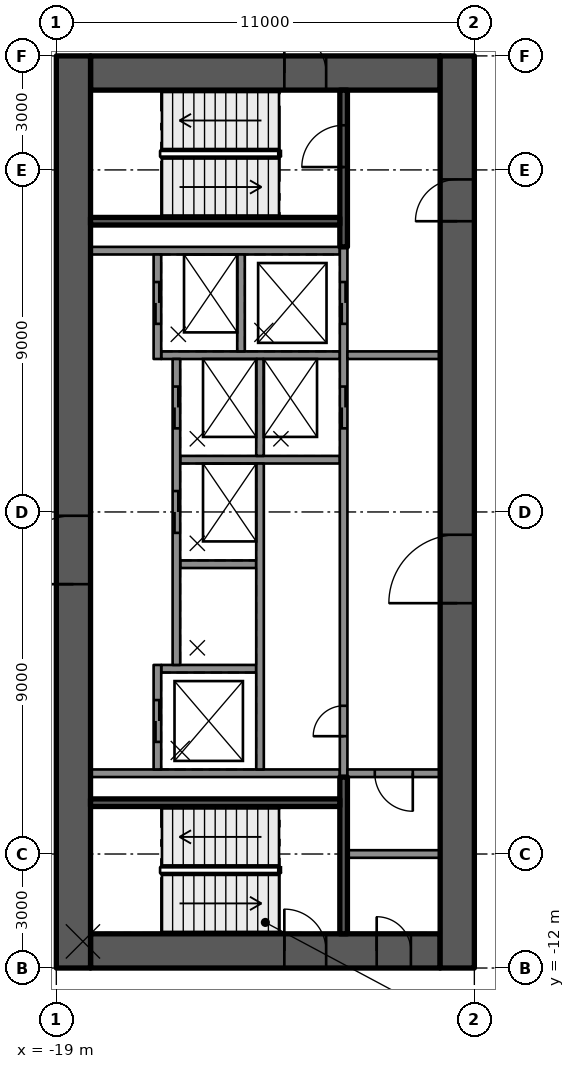
"""IFC4 building model, lengths in metres.
Left out: names, types, materials, properties, quantities, classifications, styles, units other than length and angle.
Written with IfcOpenShell. Run it as: python <this file> out.ifc"""

import sys

from ifc_helpers import new_model, si_unit, direction, frame, frame_2d, origin, place, context, subcontext, project, spatial, rectangle, extrude, element, fill, save


model = new_model("IFC4")
c1 = context("Model", 3, precision=1e-05, world=origin(), true_north=direction((0.0, 1.0)))
c2 = subcontext(c1, "Body", "Model", "MODEL_VIEW")
j1 = project(units=[si_unit("LENGTHUNIT", "METRE"), si_unit("PLANEANGLEUNIT", "RADIAN")], contexts=[c1])
p1 = place(None, origin())
s1 = spatial("IfcSite", under=j1, at=p1, CompositionType="ELEMENT")
p2 = place(p1, origin())
s2 = spatial("IfcBuilding", under=s1, at=p2, CompositionType="ELEMENT")
p3 = place(p2, frame((0.0, 0.0, 163.1)))
s3 = spatial("IfcBuildingStorey", under=s2, at=p3, CompositionType="ELEMENT", Elevation=163.1)
p4 = place(p3, frame((-18.1, 11.55, 0.0), z_axis=(0.0, 0.0, 1.0), x_axis=(1.0, 0.0, 0.0)))
e1 = element("IfcWall", 1, at=p4, inside=s3, PredefinedType="SHEAR", context=c2, shape_type="SweptSolid", body=[
    extrude(rectangle(XDim=9.2, YDim=0.9, at=frame_2d((4.6, 0.0))), origin(), (0.0, 0.0, 1.0), 4.0),
])
p5 = place(p4, frame((5.1, 0.0, 0.0)))
e2 = element("IfcOpeningElement", 2, at=p5, cuts=e1, PredefinedType="OPENING", context=c2, shape_type="SweptSolid", body=[
    extrude(rectangle(XDim=1.1, YDim=2.1, at=frame_2d((0.55, 1.05))), frame((0.0, 0.46, 0.0), z_axis=(0.0, -1.0, 0.0), x_axis=(1.0, 0.0, 0.0)), (0.0, 0.0, 1.0), 0.92),
])
p6 = place(p3, frame((-18.1, -11.55, 0.0), z_axis=(0.0, 0.0, 1.0), x_axis=(1.0, 0.0, 0.0)))
e3 = element("IfcWall", 3, at=p6, inside=s3, PredefinedType="SHEAR", context=c2, shape_type="SweptSolid", body=[
    extrude(rectangle(XDim=9.2, YDim=0.9, at=frame_2d((4.6, 0.0))), origin(), (0.0, 0.0, 1.0), 4.0),
])
p7 = place(p6, frame((5.1, 0.0, 0.0)))
e4 = element("IfcOpeningElement", 4, at=p7, cuts=e3, PredefinedType="OPENING", context=c2, shape_type="SweptSolid", body=[
    extrude(rectangle(XDim=1.1, YDim=2.1, at=frame_2d((0.55, 1.05))), frame((0.0, 0.46, 0.0), z_axis=(0.0, -1.0, 0.0), x_axis=(1.0, 0.0, 0.0)), (0.0, 0.0, 1.0), 0.92),
])
p8 = place(p6, frame((7.53, 0.0, 0.0)))
e5 = element("IfcOpeningElement", 5, at=p8, cuts=e3, PredefinedType="OPENING", context=c2, shape_type="SweptSolid", body=[
    extrude(rectangle(XDim=0.9, YDim=2.1, at=frame_2d((0.45, 1.05))), frame((0.0, 0.46, 0.0), z_axis=(0.0, -1.0, 0.0), x_axis=(1.0, 0.0, 0.0)), (0.0, 0.0, 1.0), 0.92),
])
p9 = place(p3, frame((-18.55, -12.0, 0.0), z_axis=(0.0, 0.0, 1.0), x_axis=(0.0, 1.0, 0.0)))
e6 = element("IfcWall", 6, at=p9, inside=s3, PredefinedType="SHEAR", context=c2, shape_type="SweptSolid", body=[
    extrude(rectangle(XDim=24.0, YDim=0.9, at=frame_2d((12.0, 0.0))), origin(), (0.0, 0.0, 1.0), 4.0),
])
p10 = place(p9, frame((10.1, 0.0, 0.0)))
e7 = element("IfcOpeningElement", 7, at=p10, cuts=e6, PredefinedType="OPENING", context=c2, shape_type="SweptSolid", body=[
    extrude(rectangle(XDim=1.8, YDim=2.1, at=frame_2d((0.9, 1.05))), frame((0.0, 0.46, 0.0), z_axis=(0.0, -1.0, 0.0), x_axis=(1.0, 0.0, 0.0)), (0.0, 0.0, 1.0), 0.92),
])
p11 = place(p3, frame((-8.45, -12.0, 0.0), z_axis=(0.0, 0.0, 1.0), x_axis=(0.0, 1.0, 0.0)))
e8 = element("IfcWall", 8, at=p11, inside=s3, PredefinedType="SHEAR", context=c2, shape_type="SweptSolid", body=[
    extrude(rectangle(XDim=24.0, YDim=0.9, at=frame_2d((12.0, 0.0))), origin(), (0.0, 0.0, 1.0), 4.0),
])
p12 = place(p11, frame((9.6, 0.0, 0.0)))
e9 = element("IfcOpeningElement", 9, at=p12, cuts=e8, PredefinedType="OPENING", context=c2, shape_type="SweptSolid", body=[
    extrude(rectangle(XDim=1.8, YDim=2.1, at=frame_2d((0.9, 1.05))), frame((0.0, 0.46, 0.0), z_axis=(0.0, -1.0, 0.0), x_axis=(1.0, 0.0, 0.0)), (0.0, 0.0, 1.0), 0.92),
])
p13 = place(p11, frame((19.65, 0.0, 0.0)))
e10 = element("IfcOpeningElement", 10, at=p13, cuts=e8, PredefinedType="OPENING", context=c2, shape_type="SweptSolid", body=[
    extrude(rectangle(XDim=1.1, YDim=2.1, at=frame_2d((0.55, 1.05))), frame((0.0, 0.46, 0.0), z_axis=(0.0, -1.0, 0.0), x_axis=(1.0, 0.0, 0.0)), (0.0, 0.0, 1.0), 0.92),
])
for number, where, z_axis, x_axis in (
    (11, (-11.54, 6.875, 0.0), (0.0, 0.0, 1.0), (-1.0, 0.0, 0.0)),
    (12, (-11.54, -6.875, 0.0), (0.0, 0.0, 1.0), (-1.0, 0.0, 0.0)),
):
    element("IfcWall", number, at=place(p3, frame(where, z_axis=z_axis, x_axis=x_axis)), inside=s3, PredefinedType="SOLIDWALL", context=c2, shape_type="SweptSolid", body=[
        extrude(rectangle(XDim=6.56, YDim=0.2, at=frame_2d((3.28, 0.0))), origin(), (0.0, 0.0, 1.0), 3.58),
    ])
p14 = place(p3, frame((-13.74, -4.125, 0.0), z_axis=(0.0, 0.0, 1.0), x_axis=(-1.0, 0.0, 0.0)))
e13 = element("IfcWall", 13, at=p14, inside=s3, PredefinedType="SOLIDWALL", context=c2, shape_type="SweptSolid", body=[
    extrude(rectangle(XDim=2.5, YDim=0.2, at=frame_2d((1.25, 0.0))), origin(), (0.0, 0.0, 1.0), 3.58),
])
p15 = place(p3, frame((-13.74, -1.375, 0.0), z_axis=(0.0, 0.0, 1.0), x_axis=(-1.0, 0.0, 0.0)))
e14 = element("IfcWall", 14, at=p15, inside=s3, PredefinedType="SOLIDWALL", context=c2, shape_type="SweptSolid", body=[
    extrude(rectangle(XDim=2.0, YDim=0.2, at=frame_2d((1.0, 0.0))), origin(), (0.0, 0.0, 1.0), 3.58),
])
p16 = place(p3, frame((-11.54, 1.375, 0.0), z_axis=(0.0, 0.0, 1.0), x_axis=(-1.0, 0.0, 0.0)))
e15 = element("IfcWall", 15, at=p16, inside=s3, PredefinedType="SOLIDWALL", context=c2, shape_type="SweptSolid", body=[
    extrude(rectangle(XDim=4.2, YDim=0.2, at=frame_2d((2.1, 0.0))), origin(), (0.0, 0.0, 1.0), 3.58),
])
p17 = place(p3, frame((-11.54, 4.125, 0.0), z_axis=(0.0, 0.0, 1.0), x_axis=(-1.0, 0.0, 0.0)))
e16 = element("IfcWall", 16, at=p17, inside=s3, PredefinedType="SOLIDWALL", context=c2, shape_type="SweptSolid", body=[
    extrude(rectangle(XDim=4.7, YDim=0.2, at=frame_2d((2.35, 0.0))), origin(), (0.0, 0.0, 1.0), 3.58),
])
p18 = place(p3, frame((-11.44, -6.975, 0.0), z_axis=(0.0, 0.0, 1.0), x_axis=(0.0, 1.0, 0.0)))
e17 = element("IfcWall", 17, at=p18, inside=s3, PredefinedType="SOLIDWALL", context=c2, shape_type="SweptSolid", body=[
    extrude(rectangle(XDim=13.95, YDim=0.2, at=frame_2d((6.975, 0.0))), origin(), (0.0, 0.0, 1.0), 3.58),
])
p19 = place(p18, frame((9.175, 0.0, 0.0)))
e18 = element("IfcOpeningElement", 18, at=p19, cuts=e17, PredefinedType="OPENING", context=c2, shape_type="SweptSolid", body=[
    extrude(rectangle(XDim=1.1, YDim=2.1, at=frame_2d((0.55, 1.05))), frame((0.0, 0.11, 0.0), z_axis=(0.0, -1.0, 0.0), x_axis=(1.0, 0.0, 0.0)), (0.0, 0.0, 1.0), 0.22),
])
p20 = place(p18, frame((11.925, 0.0, 0.0)))
e19 = element("IfcOpeningElement", 19, at=p20, cuts=e17, PredefinedType="OPENING", context=c2, shape_type="SweptSolid", body=[
    extrude(rectangle(XDim=1.1, YDim=2.1, at=frame_2d((0.55, 1.05))), frame((0.0, 0.11, 0.0), z_axis=(0.0, -1.0, 0.0), x_axis=(1.0, 0.0, 0.0)), (0.0, 0.0, 1.0), 0.22),
])
p21 = place(p18, frame((1.075, 0.0, 0.0)))
e20 = element("IfcOpeningElement", 20, at=p21, cuts=e17, PredefinedType="OPENING", context=c2, shape_type="SweptSolid", body=[
    extrude(rectangle(XDim=0.8, YDim=2.1, at=frame_2d((0.4, 1.05))), frame((0.0, 0.11, 0.0), z_axis=(0.0, -1.0, 0.0), x_axis=(1.0, 0.0, 0.0)), (0.0, 0.0, 1.0), 0.22),
])
p22 = place(p3, frame((-13.64, -6.775, 0.0), z_axis=(0.0, 0.0, 1.0), x_axis=(0.0, 1.0, 0.0)))
e21 = element("IfcWall", 21, at=p22, inside=s3, PredefinedType="SOLIDWALL", context=c2, shape_type="SweptSolid", body=[
    extrude(rectangle(XDim=8.05, YDim=0.2, at=frame_2d((4.025, 0.0))), origin(), (0.0, 0.0, 1.0), 3.58),
])
for number, where, z_axis, x_axis in (
    (22, (-13.64, 1.475, 0.0), (0.0, 0.0, 1.0), (0.0, 1.0, 0.0)),
    (23, (-14.14, 4.225, 0.0), (0.0, 0.0, 1.0), (0.0, 1.0, 0.0)),
):
    element("IfcWall", number, at=place(p3, frame(where, z_axis=z_axis, x_axis=x_axis)), inside=s3, PredefinedType="SOLIDWALL", context=c2, shape_type="SweptSolid", body=[
        extrude(rectangle(XDim=2.55, YDim=0.2, at=frame_2d((1.275, 0.0))), origin(), (0.0, 0.0, 1.0), 3.58),
    ])
p23 = place(p3, frame((-16.34, -6.775, 0.0), z_axis=(0.0, 0.0, 1.0), x_axis=(0.0, 1.0, 0.0)))
e24 = element("IfcWall", 24, at=p23, inside=s3, PredefinedType="SOLIDWALL", context=c2, shape_type="SweptSolid", body=[
    extrude(rectangle(XDim=2.75, YDim=0.2, at=frame_2d((1.375, 0.0))), origin(), (0.0, 0.0, 1.0), 3.58),
])
p24 = place(p23, frame((0.725, 0.0, 0.0)))
e25 = element("IfcOpeningElement", 25, at=p24, cuts=e24, PredefinedType="OPENING", context=c2, shape_type="SweptSolid", body=[
    extrude(rectangle(XDim=1.1, YDim=2.1, at=frame_2d((0.55, 1.05))), frame((0.0, 0.11, 0.0), z_axis=(0.0, -1.0, 0.0), x_axis=(1.0, 0.0, 0.0)), (0.0, 0.0, 1.0), 0.22),
])
p25 = place(p3, frame((-15.84, -4.025, 0.0), z_axis=(0.0, 0.0, 1.0), x_axis=(0.0, 1.0, 0.0)))
e26 = element("IfcWall", 26, at=p25, inside=s3, PredefinedType="SOLIDWALL", context=c2, shape_type="SweptSolid", body=[
    extrude(rectangle(XDim=8.05, YDim=0.2, at=frame_2d((4.025, 0.0))), origin(), (0.0, 0.0, 1.0), 3.58),
])
p26 = place(p25, frame((3.475, 0.0, 0.0)))
e27 = element("IfcOpeningElement", 27, at=p26, cuts=e26, PredefinedType="OPENING", context=c2, shape_type="SweptSolid", body=[
    extrude(rectangle(XDim=1.1, YDim=2.1, at=frame_2d((0.55, 1.05))), frame((0.0, 0.11, 0.0), z_axis=(0.0, -1.0, 0.0), x_axis=(1.0, 0.0, 0.0)), (0.0, 0.0, 1.0), 0.22),
])
p27 = place(p25, frame((6.225, 0.0, 0.0)))
e28 = element("IfcOpeningElement", 28, at=p27, cuts=e26, PredefinedType="OPENING", context=c2, shape_type="SweptSolid", body=[
    extrude(rectangle(XDim=1.1, YDim=2.1, at=frame_2d((0.55, 1.05))), frame((0.0, 0.11, 0.0), z_axis=(0.0, -1.0, 0.0), x_axis=(1.0, 0.0, 0.0)), (0.0, 0.0, 1.0), 0.22),
])
p28 = place(p3, frame((-16.34, 4.025, 0.0), z_axis=(0.0, 0.0, 1.0), x_axis=(0.0, 1.0, 0.0)))
e29 = element("IfcWall", 29, at=p28, inside=s3, PredefinedType="SOLIDWALL", context=c2, shape_type="SweptSolid", body=[
    extrude(rectangle(XDim=2.75, YDim=0.2, at=frame_2d((1.375, 0.0))), origin(), (0.0, 0.0, 1.0), 3.58),
])
p29 = place(p28, frame((0.925, 0.0, 0.0)))
e30 = element("IfcOpeningElement", 30, at=p29, cuts=e29, PredefinedType="OPENING", context=c2, shape_type="SweptSolid", body=[
    extrude(rectangle(XDim=1.1, YDim=2.1, at=frame_2d((0.55, 1.05))), frame((0.0, 0.11, 0.0), z_axis=(0.0, -1.0, 0.0), x_axis=(1.0, 0.0, 0.0)), (0.0, 0.0, 1.0), 0.22),
])
p30 = place(p3, frame((-11.44, 6.975, 0.0), z_axis=(0.0, 0.0, 1.0), x_axis=(0.0, 1.0, 0.0)))
e31 = element("IfcWall", 31, at=p30, inside=s3, PredefinedType="SOLIDWALL", context=c2, shape_type="SweptSolid", body=[
    extrude(rectangle(XDim=4.125, YDim=0.2, at=frame_2d((2.062, 0.0))), origin(), (0.0, 0.0, 1.0), 3.58),
])
p31 = place(p30, frame((2.1, 0.0, 0.0)))
e32 = element("IfcOpeningElement", 32, at=p31, cuts=e31, PredefinedType="OPENING", context=c2, shape_type="SweptSolid", body=[
    extrude(rectangle(XDim=1.1, YDim=2.1, at=frame_2d((0.55, 1.05))), frame((0.0, 0.11, 0.0), z_axis=(0.0, -1.0, 0.0), x_axis=(1.0, 0.0, 0.0)), (0.0, 0.0, 1.0), 0.22),
])
p32 = place(p3, frame((-11.54, 7.65, 0.0), z_axis=(0.0, 0.0, 1.0), x_axis=(-1.0, 0.0, 0.0)))
e33 = element("IfcWall", 33, at=p32, inside=s3, PredefinedType="SOLIDWALL", context=c2, shape_type="SweptSolid", body=[
    extrude(rectangle(XDim=6.56, YDim=0.2, at=frame_2d((3.28, 0.0))), origin(), (0.0, 0.0, 1.0), 3.58),
])
p33 = place(p3, frame((-11.44, -11.1, 0.0), z_axis=(0.0, 0.0, 1.0), x_axis=(0.0, 1.0, 0.0)))
e34 = element("IfcWall", 34, at=p33, inside=s3, PredefinedType="SOLIDWALL", context=c2, shape_type="SweptSolid", body=[
    extrude(rectangle(XDim=4.125, YDim=0.2, at=frame_2d((2.062, 0.0))), origin(), (0.0, 0.0, 1.0), 3.58),
])
p34 = place(p3, frame((-11.54, -7.65, 0.0), z_axis=(0.0, 0.0, 1.0), x_axis=(-1.0, 0.0, 0.0)))
e35 = element("IfcWall", 35, at=p34, inside=s3, PredefinedType="SOLIDWALL", context=c2, shape_type="SweptSolid", body=[
    extrude(rectangle(XDim=6.56, YDim=0.2, at=frame_2d((3.28, 0.0))), origin(), (0.0, 0.0, 1.0), 3.58),
])
p35 = place(p3, frame((-8.9, 4.125, 0.0), z_axis=(0.0, 0.0, 1.0), x_axis=(-1.0, 0.0, 0.0)))
e36 = element("IfcWall", 36, at=p35, inside=s3, PredefinedType="PARTITIONING", context=c2, shape_type="SweptSolid", body=[
    extrude(rectangle(XDim=2.44, YDim=0.2, at=frame_2d((1.22, 0.0))), origin(), (0.0, 0.0, 1.0), 3.58),
])
p36 = place(p3, frame((-8.9, -6.875, 0.0), z_axis=(0.0, 0.0, 1.0), x_axis=(-1.0, 0.0, 0.0)))
e37 = element("IfcWall", 37, at=p36, inside=s3, PredefinedType="PARTITIONING", context=c2, shape_type="SweptSolid", body=[
    extrude(rectangle(XDim=2.44, YDim=0.2, at=frame_2d((1.22, 0.0))), origin(), (0.0, 0.0, 1.0), 3.58),
])
p37 = place(p36, frame((0.72, 0.0, 0.0)))
e38 = element("IfcOpeningElement", 38, at=p37, cuts=e37, PredefinedType="OPENING", context=c2, shape_type="SweptSolid", body=[
    extrude(rectangle(XDim=1.0, YDim=2.1, at=frame_2d((0.5, 1.05))), frame((0.0, 0.11, 0.0), z_axis=(0.0, -1.0, 0.0), x_axis=(1.0, 0.0, 0.0)), (0.0, 0.0, 1.0), 0.22),
])
p38 = place(p3, frame((-8.9, -9.0, 0.0), z_axis=(0.0, 0.0, 1.0), x_axis=(-1.0, 0.0, 0.0)))
e39 = element("IfcWall", 39, at=p38, inside=s3, PredefinedType="PARTITIONING", context=c2, shape_type="SweptSolid", body=[
    extrude(rectangle(XDim=2.44, YDim=0.2, at=frame_2d((1.22, 0.0))), origin(), (0.0, 0.0, 1.0), 3.58),
])
p39 = place(p24, origin())
e40 = element("IfcDoor", 40, at=p39, inside=s3, OperationType="DOUBLE_DOOR_SLIDING", PredefinedType="DOOR", context=c2, shape_type="SweptSolid", body=[
    extrude(rectangle(XDim=1.1, YDim=2.1, at=frame_2d((0.55, 1.05))), frame((0.0, 0.025, 0.0), z_axis=(0.0, -1.0, 0.0), x_axis=(1.0, 0.0, 0.0)), (0.0, 0.0, 1.0), 0.05),
])
fill(e25, e40)
p40 = place(p26, origin())
e41 = element("IfcDoor", 41, at=p40, inside=s3, OperationType="DOUBLE_DOOR_SLIDING", PredefinedType="DOOR", context=c2, shape_type="SweptSolid", body=[
    extrude(rectangle(XDim=1.1, YDim=2.1, at=frame_2d((0.55, 1.05))), frame((0.0, 0.025, 0.0), z_axis=(0.0, -1.0, 0.0), x_axis=(1.0, 0.0, 0.0)), (0.0, 0.0, 1.0), 0.05),
])
fill(e27, e41)
p41 = place(p19, origin())
e42 = element("IfcDoor", 42, at=p41, inside=s3, OperationType="DOUBLE_DOOR_SLIDING", PredefinedType="DOOR", context=c2, shape_type="SweptSolid", body=[
    extrude(rectangle(XDim=1.1, YDim=2.1, at=frame_2d((0.55, 1.05))), frame((0.0, 0.025, 0.0), z_axis=(0.0, -1.0, 0.0), x_axis=(1.0, 0.0, 0.0)), (0.0, 0.0, 1.0), 0.05),
])
fill(e18, e42)
p42 = place(p27, origin())
e43 = element("IfcDoor", 43, at=p42, inside=s3, OperationType="DOUBLE_DOOR_SLIDING", PredefinedType="DOOR", context=c2, shape_type="SweptSolid", body=[
    extrude(rectangle(XDim=1.1, YDim=2.1, at=frame_2d((0.55, 1.05))), frame((0.0, 0.025, 0.0), z_axis=(0.0, -1.0, 0.0), x_axis=(1.0, 0.0, 0.0)), (0.0, 0.0, 1.0), 0.05),
])
fill(e28, e43)
p43 = place(p20, origin())
e44 = element("IfcDoor", 44, at=p43, inside=s3, OperationType="DOUBLE_DOOR_SLIDING", PredefinedType="DOOR", context=c2, shape_type="SweptSolid", body=[
    extrude(rectangle(XDim=1.1, YDim=2.1, at=frame_2d((0.55, 1.05))), frame((0.0, 0.025, 0.0), z_axis=(0.0, -1.0, 0.0), x_axis=(1.0, 0.0, 0.0)), (0.0, 0.0, 1.0), 0.05),
])
fill(e19, e44)
p44 = place(p29, origin())
e45 = element("IfcDoor", 45, at=p44, inside=s3, OperationType="DOUBLE_DOOR_SLIDING", PredefinedType="DOOR", context=c2, shape_type="SweptSolid", body=[
    extrude(rectangle(XDim=1.1, YDim=2.1, at=frame_2d((0.55, 1.05))), frame((0.0, 0.025, 0.0), z_axis=(0.0, -1.0, 0.0), x_axis=(1.0, 0.0, 0.0)), (0.0, 0.0, 1.0), 0.05),
])
fill(e30, e45)
p45 = place(p21, origin())
e46 = element("IfcDoor", 46, at=p45, inside=s3, OperationType="SINGLE_SWING_LEFT", PredefinedType="DOOR", context=c2, shape_type="SweptSolid", body=[
    extrude(rectangle(XDim=0.8, YDim=2.1, at=frame_2d((0.4, 1.05))), frame((0.0, 0.025, 0.0), z_axis=(0.0, -1.0, 0.0), x_axis=(1.0, 0.0, 0.0)), (0.0, 0.0, 1.0), 0.05),
])
fill(e20, e46)
p46 = place(p12, origin())
e47 = element("IfcDoor", 47, at=p46, inside=s3, OperationType="SINGLE_SWING_LEFT", PredefinedType="DOOR", context=c2, shape_type="SweptSolid", body=[
    extrude(rectangle(XDim=1.8, YDim=2.1, at=frame_2d((0.9, 1.05))), frame((0.0, 0.025, 0.0), z_axis=(0.0, -1.0, 0.0), x_axis=(1.0, 0.0, 0.0)), (0.0, 0.0, 1.0), 0.05),
])
fill(e9, e47)
p47 = place(p10, origin())
e48 = element("IfcDoor", 48, at=p47, inside=s3, OperationType="SINGLE_SWING_LEFT", PredefinedType="DOOR", context=c2, shape_type="SweptSolid", body=[
    extrude(rectangle(XDim=1.8, YDim=2.1, at=frame_2d((0.9, 1.05))), frame((0.0, 0.025, 0.0), z_axis=(0.0, -1.0, 0.0), x_axis=(1.0, 0.0, 0.0)), (0.0, 0.0, 1.0), 0.05),
])
fill(e7, e48)
p48 = place(p13, origin())
e49 = element("IfcDoor", 49, at=p48, inside=s3, OperationType="SINGLE_SWING_RIGHT", PredefinedType="DOOR", context=c2, shape_type="SweptSolid", body=[
    extrude(rectangle(XDim=1.1, YDim=2.1, at=frame_2d((0.55, 1.05))), frame((0.0, 0.025, 0.0), z_axis=(0.0, -1.0, 0.0), x_axis=(1.0, 0.0, 0.0)), (0.0, 0.0, 1.0), 0.05),
])
fill(e10, e49)
p49 = place(p5, origin())
e50 = element("IfcDoor", 50, at=p49, inside=s3, OperationType="SINGLE_SWING_RIGHT", PredefinedType="DOOR", context=c2, shape_type="SweptSolid", body=[
    extrude(rectangle(XDim=1.1, YDim=2.1, at=frame_2d((0.55, 1.05))), frame((0.0, 0.025, 0.0), z_axis=(0.0, -1.0, 0.0), x_axis=(1.0, 0.0, 0.0)), (0.0, 0.0, 1.0), 0.05),
])
fill(e2, e50)
p50 = place(p7, origin())
e51 = element("IfcDoor", 51, at=p50, inside=s3, OperationType="SINGLE_SWING_RIGHT", PredefinedType="DOOR", context=c2, shape_type="SweptSolid", body=[
    extrude(rectangle(XDim=1.1, YDim=2.1, at=frame_2d((0.55, 1.05))), frame((0.0, 0.025, 0.0), z_axis=(0.0, -1.0, 0.0), x_axis=(1.0, 0.0, 0.0)), (0.0, 0.0, 1.0), 0.05),
])
fill(e4, e51)
p51 = place(p31, origin())
e52 = element("IfcDoor", 52, at=p51, inside=s3, OperationType="SINGLE_SWING_RIGHT", PredefinedType="DOOR", context=c2, shape_type="SweptSolid", body=[
    extrude(rectangle(XDim=1.1, YDim=2.1, at=frame_2d((0.55, 1.05))), frame((0.0, 0.025, 0.0), z_axis=(0.0, -1.0, 0.0), x_axis=(1.0, 0.0, 0.0)), (0.0, 0.0, 1.0), 0.05),
])
fill(e32, e52)
p52 = place(p8, origin())
e53 = element("IfcDoor", 53, at=p52, inside=s3, OperationType="SINGLE_SWING_RIGHT", PredefinedType="DOOR", context=c2, shape_type="SweptSolid", body=[
    extrude(rectangle(XDim=0.9, YDim=2.1, at=frame_2d((0.45, 1.05))), frame((0.0, 0.025, 0.0), z_axis=(0.0, -1.0, 0.0), x_axis=(1.0, 0.0, 0.0)), (0.0, 0.0, 1.0), 0.05),
])
fill(e5, e53)
p53 = place(p37, origin())
e54 = element("IfcDoor", 54, at=p53, inside=s3, OperationType="SINGLE_SWING_RIGHT", PredefinedType="DOOR", context=c2, shape_type="SweptSolid", body=[
    extrude(rectangle(XDim=1.0, YDim=2.1, at=frame_2d((0.5, 1.05))), frame((0.0, 0.025, 0.0), z_axis=(0.0, -1.0, 0.0), x_axis=(1.0, 0.0, 0.0)), (0.0, 0.0, 1.0), 0.05),
])
fill(e38, e54)
save(model, sys.argv[1])
